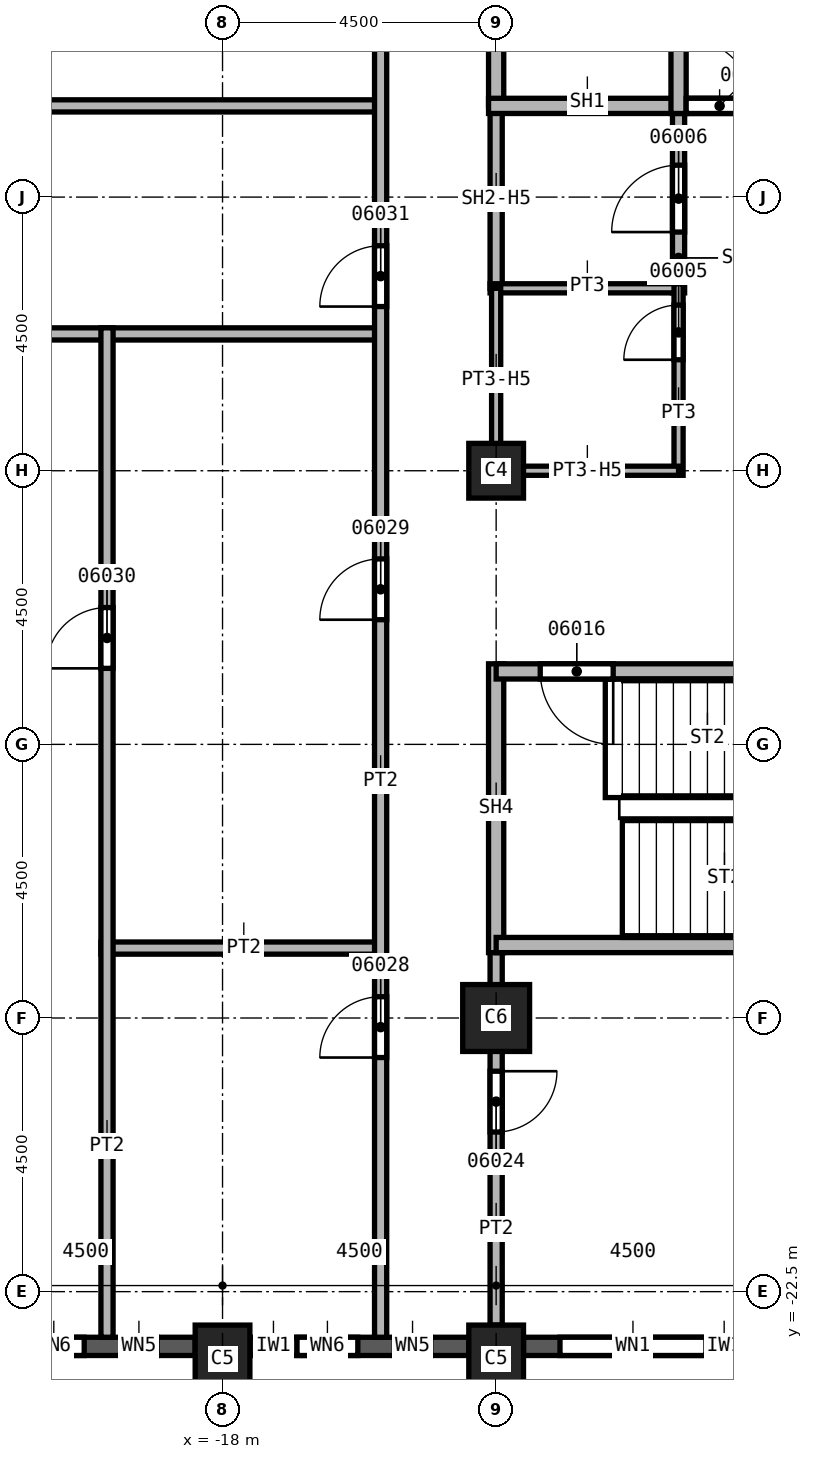
"""IFC4 building model, lengths in metres.
Left out: names, types, materials, properties, quantities, classifications, styles, units other than length and angle.
Written with IfcOpenShell. Run it as: python <this file> out.ifc"""

import sys

from ifc_helpers import new_model, si_unit, direction, frame, frame_2d, origin, origin_2d, place, context, subcontext, project, spatial, rectangle, extrude, element, fill, save


model = new_model("IFC4")
c1 = context("Model", 3, precision=1e-05, world=origin(), true_north=direction((0.0, 1.0)))
c2 = subcontext(c1, "Body", "Model", "MODEL_VIEW")
j1 = project(units=[si_unit("LENGTHUNIT", "METRE"), si_unit("PLANEANGLEUNIT", "RADIAN")], contexts=[c1])
p1 = place(None, origin())
s1 = spatial("IfcSite", under=j1, at=p1, CompositionType="ELEMENT")
p2 = place(p1, origin())
s2 = spatial("IfcBuilding", under=s1, at=p2, CompositionType="ELEMENT")
p3 = place(p2, frame((0.0, 0.0, 126.0)))
s3 = spatial("IfcBuildingStorey", under=s2, at=p3, CompositionType="ELEMENT", Elevation=126.0)
p4 = place(p3, frame((-13.5, -18.0, 0.0), z_axis=(0.0, 0.0, 1.0), x_axis=(1.0, 0.0, 0.0)))
e1 = element("IfcColumn", 1, at=p4, inside=s3, PredefinedType="COLUMN", context=c2, shape_type="SweptSolid", body=[
    extrude(rectangle(XDim=1.1, YDim=1.1, at=origin_2d()), origin(), (0.0, 0.0, 1.0), 3.7),
])
p5 = place(p3, frame((-13.5, -9.0, 0.0), z_axis=(0.0, 0.0, 1.0), x_axis=(1.0, 0.0, 0.0)))
e2 = element("IfcColumn", 2, at=p5, inside=s3, PredefinedType="COLUMN", context=c2, shape_type="SweptSolid", body=[
    extrude(rectangle(XDim=0.9, YDim=0.9, at=origin_2d()), origin(), (0.0, 0.0, 1.0), 3.7),
])
for number, where, z_axis, x_axis in (
    (3, (-13.5, -23.6, 0.0), (0.0, 0.0, 1.0), (1.0, 0.0, 0.0)),
    (4, (-18.0, -23.6, 0.0), (0.0, 0.0, 1.0), (1.0, 0.0, 0.0)),
):
    element("IfcColumn", number, at=place(p3, frame(where, z_axis=z_axis, x_axis=x_axis)), inside=s3, PredefinedType="COLUMN", context=c2, shape_type="SweptSolid", body=[
        extrude(rectangle(XDim=0.9, YDim=1.1, at=origin_2d()), origin(), (0.0, 0.0, 1.0), 3.7),
    ])
p6 = place(p3, frame((-22.05, -23.4, 0.0), z_axis=(0.0, 0.0, 1.0), x_axis=(1.0, 0.0, 0.0)))
e5 = element("IfcWall", 5, at=p6, inside=s3, PredefinedType="SOLIDWALL", context=c2, shape_type="SweptSolid", body=[
    extrude(rectangle(XDim=3.6, YDim=0.3, at=frame_2d((1.8, 0.0))), origin(), (0.0, 0.0, 1.0), 3.1),
])
p7 = place(p6, frame((0.775, 0.0, 0.8)))
e6 = element("IfcOpeningElement", 6, at=p7, cuts=e5, PredefinedType="OPENING", context=c2, shape_type="SweptSolid", body=[
    extrude(rectangle(XDim=1.0, YDim=1.95, at=frame_2d((0.5, 0.975))), frame((0.0, 0.15, 0.0), z_axis=(0.0, -1.0, 0.0), x_axis=(1.0, 0.0, 0.0)), (0.0, 0.0, 1.0), 0.3),
])
p8 = place(p6, frame((2.375, 0.0, 0.8)))
e7 = element("IfcOpeningElement", 7, at=p8, cuts=e5, PredefinedType="OPENING", context=c2, shape_type="SweptSolid", body=[
    extrude(rectangle(XDim=0.6, YDim=1.95, at=frame_2d((0.3, 0.975))), frame((0.0, 0.15, 0.0), z_axis=(0.0, -1.0, 0.0), x_axis=(1.0, 0.0, 0.0)), (0.0, 0.0, 1.0), 0.3),
])
p9 = place(p3, frame((-17.55, -23.4, 0.0), z_axis=(0.0, 0.0, 1.0), x_axis=(1.0, 0.0, 0.0)))
e8 = element("IfcWall", 8, at=p9, inside=s3, PredefinedType="SOLIDWALL", context=c2, shape_type="SweptSolid", body=[
    extrude(rectangle(XDim=3.6, YDim=0.3, at=frame_2d((1.8, 0.0))), origin(), (0.0, 0.0, 1.0), 3.1),
])
p10 = place(p9, frame((0.775, 0.0, 0.8)))
e9 = element("IfcOpeningElement", 9, at=p10, cuts=e8, PredefinedType="OPENING", context=c2, shape_type="SweptSolid", body=[
    extrude(rectangle(XDim=1.0, YDim=1.95, at=frame_2d((0.5, 0.975))), frame((0.0, 0.15, 0.0), z_axis=(0.0, -1.0, 0.0), x_axis=(1.0, 0.0, 0.0)), (0.0, 0.0, 1.0), 0.3),
])
p11 = place(p9, frame((2.375, 0.0, 0.8)))
e10 = element("IfcOpeningElement", 10, at=p11, cuts=e8, PredefinedType="OPENING", context=c2, shape_type="SweptSolid", body=[
    extrude(rectangle(XDim=0.6, YDim=1.95, at=frame_2d((0.3, 0.975))), frame((0.0, 0.15, 0.0), z_axis=(0.0, -1.0, 0.0), x_axis=(1.0, 0.0, 0.0)), (0.0, 0.0, 1.0), 0.3),
])
p12 = place(p3, frame((-13.05, -23.4, 0.0), z_axis=(0.0, 0.0, 1.0), x_axis=(1.0, 0.0, 0.0)))
e11 = element("IfcWall", 11, at=p12, inside=s3, PredefinedType="SOLIDWALL", context=c2, shape_type="SweptSolid", body=[
    extrude(rectangle(XDim=3.6, YDim=0.3, at=frame_2d((1.8, 0.0))), origin(), (0.0, 0.0, 1.0), 3.1),
])
p13 = place(p12, frame((0.6, 0.0, 0.8)))
e12 = element("IfcOpeningElement", 12, at=p13, cuts=e11, PredefinedType="OPENING", context=c2, shape_type="SweptSolid", body=[
    extrude(rectangle(XDim=2.4, YDim=1.95, at=frame_2d((1.2, 0.975))), frame((0.0, 0.15, 0.0), z_axis=(0.0, -1.0, 0.0), x_axis=(1.0, 0.0, 0.0)), (0.0, 0.0, 1.0), 0.3),
])
for number, where, z_axis, x_axis in (
    (13, (-27.1, -6.75, 0.0), (0.0, 0.0, 1.0), (1.0, 0.0, 0.0)),
    (14, (-27.1, -3.0, 0.0), (0.0, 0.0, 1.0), (1.0, 0.0, 0.0)),
):
    element("IfcWall", number, at=place(p3, frame(where, z_axis=z_axis, x_axis=x_axis)), inside=s3, PredefinedType="PARTITIONING", context=c2, shape_type="SweptSolid", body=[
        extrude(rectangle(XDim=11.7, YDim=0.2, at=frame_2d((5.85, 0.0))), origin(), (0.0, 0.0, 1.0), 3.7),
    ])
p14 = place(p3, frame((-20.0, -16.85, 0.0), z_axis=(0.0, 0.0, 1.0), x_axis=(1.0, 0.0, 0.0)))
e15 = element("IfcWall", 15, at=p14, inside=s3, PredefinedType="PARTITIONING", context=c2, shape_type="SweptSolid", body=[
    extrude(rectangle(XDim=4.6, YDim=0.2, at=frame_2d((2.3, 0.0))), origin(), (0.0, 0.0, 1.0), 3.7),
])
p15 = place(p3, frame((-19.9, -23.25, 0.0), z_axis=(0.0, 0.0, 1.0), x_axis=(0.0, 1.0, 0.0)))
e16 = element("IfcWall", 16, at=p15, inside=s3, PredefinedType="PARTITIONING", context=c2, shape_type="SweptSolid", body=[
    extrude(rectangle(XDim=16.6, YDim=0.2, at=frame_2d((8.3, 0.0))), origin(), (0.0, 0.0, 1.0), 3.7),
])
p16 = place(p15, frame((11.0, 0.0, 0.0)))
e17 = element("IfcOpeningElement", 17, at=p16, cuts=e16, PredefinedType="OPENING", context=c2, shape_type="SweptSolid", body=[
    extrude(rectangle(XDim=1.0, YDim=2.1, at=frame_2d((0.5, 1.05))), frame((0.0, 0.1, 0.0), z_axis=(0.0, -1.0, 0.0), x_axis=(1.0, 0.0, 0.0)), (0.0, 0.0, 1.0), 0.2),
])
p17 = place(p3, frame((-15.4, -23.25, 0.0), z_axis=(0.0, 0.0, 1.0), x_axis=(0.0, 1.0, 0.0)))
e18 = element("IfcWall", 18, at=p17, inside=s3, PredefinedType="PARTITIONING", context=c2, shape_type="SweptSolid", body=[
    extrude(rectangle(XDim=24.1, YDim=0.2, at=frame_2d((12.05, 0.0))), origin(), (0.0, 0.0, 1.0), 3.7),
])
p18 = place(p17, frame((4.6, 0.0, 0.0)))
e19 = element("IfcOpeningElement", 19, at=p18, cuts=e18, PredefinedType="OPENING", context=c2, shape_type="SweptSolid", body=[
    extrude(rectangle(XDim=1.0, YDim=2.1, at=frame_2d((0.5, 1.05))), frame((0.0, 0.1, 0.0), z_axis=(0.0, -1.0, 0.0), x_axis=(1.0, 0.0, 0.0)), (0.0, 0.0, 1.0), 0.2),
])
p19 = place(p17, frame((11.8, 0.0, 0.0)))
e20 = element("IfcOpeningElement", 20, at=p19, cuts=e18, PredefinedType="OPENING", context=c2, shape_type="SweptSolid", body=[
    extrude(rectangle(XDim=1.0, YDim=2.1, at=frame_2d((0.5, 1.05))), frame((0.0, 0.1, 0.0), z_axis=(0.0, -1.0, 0.0), x_axis=(1.0, 0.0, 0.0)), (0.0, 0.0, 1.0), 0.2),
])
p20 = place(p17, frame((16.95, 0.0, 0.0)))
e21 = element("IfcOpeningElement", 21, at=p20, cuts=e18, PredefinedType="OPENING", context=c2, shape_type="SweptSolid", body=[
    extrude(rectangle(XDim=1.0, YDim=2.1, at=frame_2d((0.5, 1.05))), frame((0.0, 0.1, 0.0), z_axis=(0.0, -1.0, 0.0), x_axis=(1.0, 0.0, 0.0)), (0.0, 0.0, 1.0), 0.2),
])
p21 = place(p3, frame((-13.5, -16.675, 0.0), z_axis=(0.0, 0.0, 1.0), x_axis=(0.0, -1.0, 0.0)))
e22 = element("IfcWall", 22, at=p21, inside=s3, PredefinedType="PARTITIONING", context=c2, shape_type="SweptSolid", body=[
    extrude(rectangle(XDim=6.375, YDim=0.2, at=frame_2d((3.188, 0.0))), origin(), (0.0, 0.0, 1.0), 3.7),
])
p22 = place(p21, frame((2.2, 0.0, 0.0)))
e23 = element("IfcOpeningElement", 23, at=p22, cuts=e22, PredefinedType="OPENING", context=c2, shape_type="SweptSolid", body=[
    extrude(rectangle(XDim=1.0, YDim=2.1, at=frame_2d((0.5, 1.05))), frame((0.0, 0.1, 0.0), z_axis=(0.0, -1.0, 0.0), x_axis=(1.0, 0.0, 0.0)), (0.0, 0.0, 1.0), 0.2),
])
p23 = place(p3, frame((-13.5, -6.0, 0.0), z_axis=(0.0, 0.0, 1.0), x_axis=(0.0, 1.0, 0.0)))
e24 = element("IfcWall", 24, at=p23, inside=s3, PredefinedType="SOLIDWALL", context=c2, shape_type="SweptSolid", body=[
    extrude(rectangle(XDim=3.0, YDim=0.2, at=frame_2d((1.5, 0.0))), origin(), (0.0, 0.0, 1.0), 2.938),
])
p24 = place(p3, frame((-10.5, -6.075, 0.0), z_axis=(0.0, 0.0, 1.0), x_axis=(0.0, 1.0, 0.0)))
e25 = element("IfcWall", 25, at=p24, inside=s3, PredefinedType="SOLIDWALL", context=c2, shape_type="SweptSolid", body=[
    extrude(rectangle(XDim=3.2, YDim=0.2, at=frame_2d((1.6, 0.0))), origin(), (0.0, 0.0, 1.0), 3.7),
])
p25 = place(p24, frame((1.0, 0.0, 0.0)))
e26 = element("IfcOpeningElement", 26, at=p25, cuts=e25, PredefinedType="OPENING", context=c2, shape_type="SweptSolid", body=[
    extrude(rectangle(XDim=1.1, YDim=2.1, at=frame_2d((0.55, 1.05))), frame((0.0, 0.1, 0.0), z_axis=(0.0, -1.0, 0.0), x_axis=(1.0, 0.0, 0.0)), (0.0, 0.0, 1.0), 0.2),
])
p26 = place(p3, frame((-13.5, -3.0, 0.0), z_axis=(0.0, 0.0, 1.0), x_axis=(0.0, 1.0, 0.0)))
e27 = element("IfcWall", 27, at=p26, inside=s3, PredefinedType="SOLIDWALL", context=c2, shape_type="SweptSolid", body=[
    extrude(rectangle(XDim=6.0, YDim=0.25, at=frame_2d((3.0, 0.0))), origin(), (0.0, 0.0, 1.0), 2.938),
])
p27 = place(p3, frame((-13.625, -3.0, 0.0), z_axis=(0.0, 0.0, 1.0), x_axis=(1.0, 0.0, 0.0)))
e28 = element("IfcWall", 28, at=p27, inside=s3, PredefinedType="SOLIDWALL", context=c2, shape_type="SweptSolid", body=[
    extrude(rectangle(XDim=9.25, YDim=0.25, at=frame_2d((4.625, 0.0))), origin(), (0.0, 0.0, 1.0), 3.7),
])
p28 = place(p27, frame((3.25, 0.0, 0.0)))
e29 = element("IfcOpeningElement", 29, at=p28, cuts=e28, PredefinedType="OPENING", context=c2, shape_type="SweptSolid", body=[
    extrude(rectangle(XDim=1.1, YDim=2.1, at=frame_2d((0.55, 1.05))), frame((0.0, 0.125, 0.0), z_axis=(0.0, -1.0, 0.0), x_axis=(1.0, 0.0, 0.0)), (0.0, 0.0, 1.0), 0.25),
])
p29 = place(p3, frame((-10.5, -3.125, 0.0), z_axis=(0.0, 0.0, 1.0), x_axis=(0.0, 1.0, 0.0)))
e30 = element("IfcWall", 30, at=p29, inside=s3, PredefinedType="SOLIDWALL", context=c2, shape_type="SweptSolid", body=[
    extrude(rectangle(XDim=6.25, YDim=0.25, at=frame_2d((3.125, 0.0))), origin(), (0.0, 0.0, 1.0), 3.7),
])
p30 = place(p29, frame((1.075, 0.0, 0.0)))
e31 = element("IfcOpeningElement", 31, at=p30, cuts=e30, PredefinedType="OPENING", context=c2, shape_type="SweptSolid", body=[
    extrude(rectangle(XDim=1.1, YDim=2.1, at=frame_2d((0.55, 1.05))), frame((0.0, 0.125, 0.0), z_axis=(0.0, -1.0, 0.0), x_axis=(1.0, 0.0, 0.0)), (0.0, 0.0, 1.0), 0.25),
])
p31 = place(p29, frame((4.075, 0.0, 0.0)))
e32 = element("IfcOpeningElement", 32, at=p31, cuts=e30, PredefinedType="OPENING", context=c2, shape_type="SweptSolid", body=[
    extrude(rectangle(XDim=1.1, YDim=2.1, at=frame_2d((0.55, 1.05))), frame((0.0, 0.125, 0.0), z_axis=(0.0, -1.0, 0.0), x_axis=(1.0, 0.0, 0.0)), (0.0, 0.0, 1.0), 0.25),
])
p32 = place(p3, frame((-13.5, -12.175, 0.0), z_axis=(0.0, 0.0, 1.0), x_axis=(0.0, -1.0, 0.0)))
e33 = element("IfcWall", 33, at=p32, inside=s3, PredefinedType="SOLIDWALL", context=c2, shape_type="SweptSolid", body=[
    extrude(rectangle(XDim=4.75, YDim=0.25, at=frame_2d((2.375, 0.0))), origin(), (0.0, 0.0, 1.0), 3.7),
])
p33 = place(p3, frame((-4.5, -16.8, 0.0), z_axis=(0.0, 0.0, 1.0), x_axis=(-1.0, 0.0, 0.0)))
e34 = element("IfcWall", 34, at=p33, inside=s3, PredefinedType="SOLIDWALL", context=c2, shape_type="SweptSolid", body=[
    extrude(rectangle(XDim=9.0, YDim=0.25, at=frame_2d((4.5, 0.0))), origin(), (0.0, 0.0, 1.0), 3.7),
])
p34 = place(p3, frame((-4.375, -12.3, 0.0), z_axis=(0.0, 0.0, 1.0), x_axis=(-1.0, 0.0, 0.0)))
e35 = element("IfcWall", 35, at=p34, inside=s3, PredefinedType="SOLIDWALL", context=c2, shape_type="SweptSolid", body=[
    extrude(rectangle(XDim=9.125, YDim=0.25, at=frame_2d((4.562, 0.0))), origin(), (0.0, 0.0, 1.0), 3.7),
])
p35 = place(p34, frame((7.2, 0.0, 0.0)))
e36 = element("IfcOpeningElement", 36, at=p35, cuts=e35, PredefinedType="OPENING", context=c2, shape_type="SweptSolid", body=[
    extrude(rectangle(XDim=1.2, YDim=2.1, at=frame_2d((0.6, 1.05))), frame((0.0, 0.125, 0.0), z_axis=(0.0, -1.0, 0.0), x_axis=(1.0, 0.0, 0.0)), (0.0, 0.0, 1.0), 0.25),
])
p36 = place(p3, frame((-13.6, -6.0, 0.0), z_axis=(0.0, 0.0, 1.0), x_axis=(1.0, 0.0, 0.0)))
e37 = element("IfcWall", 37, at=p36, inside=s3, PredefinedType="PARTITIONING", context=c2, shape_type="SweptSolid", body=[
    extrude(rectangle(XDim=3.1, YDim=0.15, at=frame_2d((1.55, 0.0))), origin(), (0.0, 0.0, 1.0), 3.7),
])
p37 = place(p3, frame((-13.5, -9.075, 0.0), z_axis=(0.0, 0.0, 1.0), x_axis=(0.0, 1.0, 0.0)))
e38 = element("IfcWall", 38, at=p37, inside=s3, PredefinedType="PARTITIONING", context=c2, shape_type="SweptSolid", body=[
    extrude(rectangle(XDim=3.075, YDim=0.15, at=frame_2d((1.538, 0.0))), origin(), (0.0, 0.0, 1.0), 2.938),
])
p38 = place(p3, frame((-10.5, -9.075, 0.0), z_axis=(0.0, 0.0, 1.0), x_axis=(0.0, 1.0, 0.0)))
e39 = element("IfcWall", 39, at=p38, inside=s3, PredefinedType="PARTITIONING", context=c2, shape_type="SweptSolid", body=[
    extrude(rectangle(XDim=3.15, YDim=0.15, at=frame_2d((1.575, 0.0))), origin(), (0.0, 0.0, 1.0), 3.7),
])
p39 = place(p38, frame((1.9, 0.0, 0.0)))
e40 = element("IfcOpeningElement", 40, at=p39, cuts=e39, PredefinedType="OPENING", context=c2, shape_type="SweptSolid", body=[
    extrude(rectangle(XDim=0.9, YDim=2.1, at=frame_2d((0.45, 1.05))), frame((0.0, 0.075, 0.0), z_axis=(0.0, -1.0, 0.0), x_axis=(1.0, 0.0, 0.0)), (0.0, 0.0, 1.0), 0.15),
])
p40 = place(p3, frame((-10.5, -9.0, 0.0), z_axis=(0.0, 0.0, 1.0), x_axis=(-1.0, 0.0, 0.0)))
e41 = element("IfcWall", 41, at=p40, inside=s3, PredefinedType="PARTITIONING", context=c2, shape_type="SweptSolid", body=[
    extrude(rectangle(XDim=3.0, YDim=0.15, at=frame_2d((1.5, 0.0))), origin(), (0.0, 0.0, 1.0), 2.938),
])
p41 = place(p13, origin())
e42 = element("IfcWindow", 42, at=p41, inside=s3, PartitioningType="SINGLE_PANEL", PredefinedType="WINDOW", context=c2, shape_type="SweptSolid", body=[
    extrude(rectangle(XDim=2.4, YDim=1.95, at=frame_2d((1.2, 0.975))), frame((0.0, 0.03, 0.0), z_axis=(0.0, -1.0, 0.0), x_axis=(1.0, 0.0, 0.0)), (0.0, 0.0, 1.0), 0.06),
])
fill(e12, e42)
p42 = place(p28, origin())
e43 = element("IfcDoor", 43, at=p42, inside=s3, OperationType="SINGLE_SWING_RIGHT", PredefinedType="DOOR", context=c2, shape_type="SweptSolid", body=[
    extrude(rectangle(XDim=1.1, YDim=2.1, at=frame_2d((0.55, 1.05))), frame((0.0, 0.025, 0.0), z_axis=(0.0, -1.0, 0.0), x_axis=(1.0, 0.0, 0.0)), (0.0, 0.0, 1.0), 0.05),
])
fill(e29, e43)
p43 = place(p39, origin())
e44 = element("IfcDoor", 44, at=p43, inside=s3, OperationType="SINGLE_SWING_RIGHT", PredefinedType="DOOR", context=c2, shape_type="SweptSolid", body=[
    extrude(rectangle(XDim=0.9, YDim=2.1, at=frame_2d((0.45, 1.05))), frame((0.0, 0.025, 0.0), z_axis=(0.0, -1.0, 0.0), x_axis=(1.0, 0.0, 0.0)), (0.0, 0.0, 1.0), 0.05),
])
fill(e40, e44)
p44 = place(p25, origin())
e45 = element("IfcDoor", 45, at=p44, inside=s3, OperationType="SINGLE_SWING_LEFT", PredefinedType="DOOR", context=c2, shape_type="SweptSolid", body=[
    extrude(rectangle(XDim=1.1, YDim=2.1, at=frame_2d((0.55, 1.05))), frame((0.0, 0.025, 0.0), z_axis=(0.0, -1.0, 0.0), x_axis=(1.0, 0.0, 0.0)), (0.0, 0.0, 1.0), 0.05),
])
fill(e26, e45)
p45 = place(p35, origin())
e46 = element("IfcDoor", 46, at=p45, inside=s3, OperationType="SINGLE_SWING_LEFT", PredefinedType="DOOR", context=c2, shape_type="SweptSolid", body=[
    extrude(rectangle(XDim=1.2, YDim=2.1, at=frame_2d((0.6, 1.05))), frame((0.0, 0.025, 0.0), z_axis=(0.0, -1.0, 0.0), x_axis=(1.0, 0.0, 0.0)), (0.0, 0.0, 1.0), 0.05),
])
fill(e36, e46)
p46 = place(p22, origin())
e47 = element("IfcDoor", 47, at=p46, inside=s3, OperationType="SINGLE_SWING_LEFT", PredefinedType="DOOR", context=c2, shape_type="SweptSolid", body=[
    extrude(rectangle(XDim=1.0, YDim=2.1, at=frame_2d((0.5, 1.05))), frame((0.0, 0.025, 0.0), z_axis=(0.0, -1.0, 0.0), x_axis=(1.0, 0.0, 0.0)), (0.0, 0.0, 1.0), 0.05),
])
fill(e23, e47)
p47 = place(p18, origin())
e48 = element("IfcDoor", 48, at=p47, inside=s3, OperationType="SINGLE_SWING_LEFT", PredefinedType="DOOR", context=c2, shape_type="SweptSolid", body=[
    extrude(rectangle(XDim=1.0, YDim=2.1, at=frame_2d((0.5, 1.05))), frame((0.0, 0.025, 0.0), z_axis=(0.0, -1.0, 0.0), x_axis=(1.0, 0.0, 0.0)), (0.0, 0.0, 1.0), 0.05),
])
fill(e19, e48)
p48 = place(p19, origin())
e49 = element("IfcDoor", 49, at=p48, inside=s3, OperationType="SINGLE_SWING_RIGHT", PredefinedType="DOOR", context=c2, shape_type="SweptSolid", body=[
    extrude(rectangle(XDim=1.0, YDim=2.1, at=frame_2d((0.5, 1.05))), frame((0.0, 0.025, 0.0), z_axis=(0.0, -1.0, 0.0), x_axis=(1.0, 0.0, 0.0)), (0.0, 0.0, 1.0), 0.05),
])
fill(e20, e49)
p49 = place(p16, origin())
e50 = element("IfcDoor", 50, at=p49, inside=s3, OperationType="SINGLE_SWING_LEFT", PredefinedType="DOOR", context=c2, shape_type="SweptSolid", body=[
    extrude(rectangle(XDim=1.0, YDim=2.1, at=frame_2d((0.5, 1.05))), frame((0.0, 0.025, 0.0), z_axis=(0.0, -1.0, 0.0), x_axis=(1.0, 0.0, 0.0)), (0.0, 0.0, 1.0), 0.05),
])
fill(e17, e50)
p50 = place(p20, origin())
e51 = element("IfcDoor", 51, at=p50, inside=s3, OperationType="SINGLE_SWING_RIGHT", PredefinedType="DOOR", context=c2, shape_type="SweptSolid", body=[
    extrude(rectangle(XDim=1.0, YDim=2.1, at=frame_2d((0.5, 1.05))), frame((0.0, 0.025, 0.0), z_axis=(0.0, -1.0, 0.0), x_axis=(1.0, 0.0, 0.0)), (0.0, 0.0, 1.0), 0.05),
])
fill(e21, e51)
p51 = place(p7, origin())
e52 = element("IfcWindow", 52, at=p51, inside=s3, PartitioningType="SINGLE_PANEL", PredefinedType="WINDOW", context=c2, shape_type="SweptSolid", body=[
    extrude(rectangle(XDim=1.0, YDim=1.95, at=frame_2d((0.5, 0.975))), frame((0.0, 0.03, 0.0), z_axis=(0.0, -1.0, 0.0), x_axis=(1.0, 0.0, 0.0)), (0.0, 0.0, 1.0), 0.06),
])
fill(e6, e52)
p52 = place(p8, origin())
e53 = element("IfcWindow", 53, at=p52, inside=s3, PartitioningType="SINGLE_PANEL", PredefinedType="WINDOW", context=c2, shape_type="SweptSolid", body=[
    extrude(rectangle(XDim=0.6, YDim=1.95, at=frame_2d((0.3, 0.975))), frame((0.0, 0.03, 0.0), z_axis=(0.0, -1.0, 0.0), x_axis=(1.0, 0.0, 0.0)), (0.0, 0.0, 1.0), 0.06),
])
fill(e7, e53)
p53 = place(p10, origin())
e54 = element("IfcWindow", 54, at=p53, inside=s3, PartitioningType="SINGLE_PANEL", PredefinedType="WINDOW", context=c2, shape_type="SweptSolid", body=[
    extrude(rectangle(XDim=1.0, YDim=1.95, at=frame_2d((0.5, 0.975))), frame((0.0, 0.03, 0.0), z_axis=(0.0, -1.0, 0.0), x_axis=(1.0, 0.0, 0.0)), (0.0, 0.0, 1.0), 0.06),
])
fill(e9, e54)
p54 = place(p11, origin())
e55 = element("IfcWindow", 55, at=p54, inside=s3, PartitioningType="SINGLE_PANEL", PredefinedType="WINDOW", context=c2, shape_type="SweptSolid", body=[
    extrude(rectangle(XDim=0.6, YDim=1.95, at=frame_2d((0.3, 0.975))), frame((0.0, 0.03, 0.0), z_axis=(0.0, -1.0, 0.0), x_axis=(1.0, 0.0, 0.0)), (0.0, 0.0, 1.0), 0.06),
])
fill(e10, e55)
save(model, sys.argv[1])
